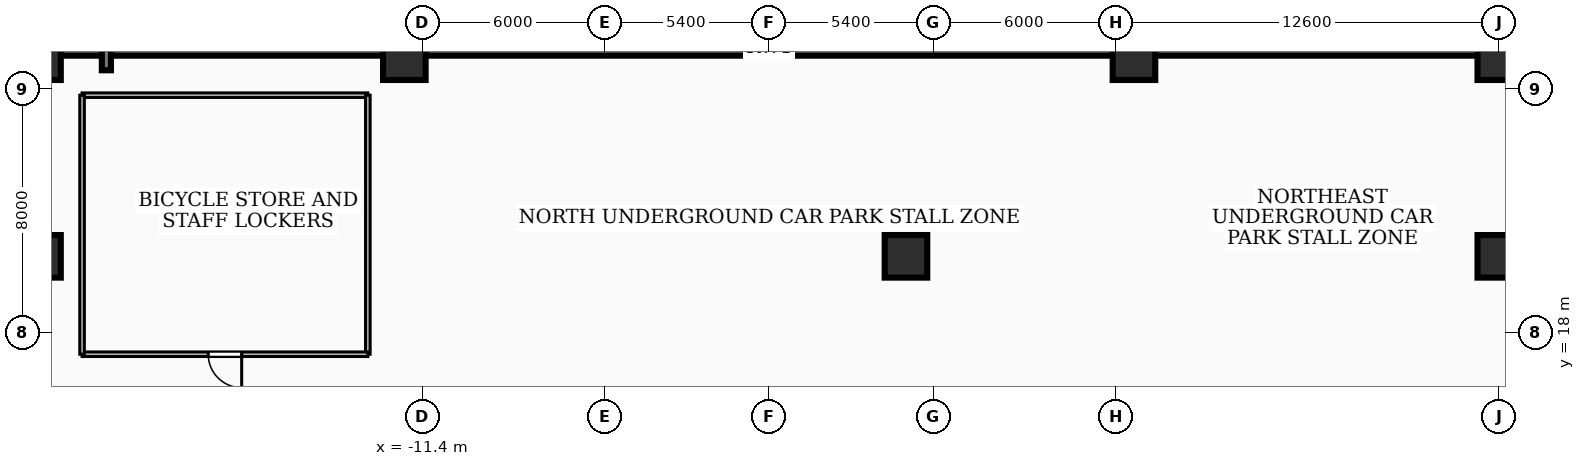
"""IFC4 building model, lengths in metres.
Left out: names, types, materials, properties, quantities, classifications, styles, units other than length and angle.
Written with IfcOpenShell. Run it as: python <this file> out.ifc"""

import sys

from ifc_helpers import new_model, si_unit, direction, frame, frame_2d, origin, origin_2d, place, context, subcontext, project, spatial, rectangle, extrude, element, fill, save


model = new_model("IFC4")
c1 = context("Model", 3, precision=1e-05, world=origin(), true_north=direction((0.0, 1.0)))
c2 = subcontext(c1, "Body", "Model", "MODEL_VIEW")
j1 = project(units=[si_unit("LENGTHUNIT", "METRE"), si_unit("PLANEANGLEUNIT", "RADIAN")], contexts=[c1])
p1 = place(None, origin())
s1 = spatial("IfcSite", under=j1, at=p1, CompositionType="ELEMENT")
p2 = place(p1, origin())
s2 = spatial("IfcBuilding", under=s1, at=p2, CompositionType="ELEMENT")
p3 = place(p2, frame((0.0, 0.0, -4.5)))
s3 = spatial("IfcBuildingStorey", under=s2, at=p3, CompositionType="ELEMENT", Elevation=-4.5)
p4 = place(p3, frame((-35.75, 27.35, 0.0), z_axis=(0.0, 0.0, 1.0), x_axis=(1.0, 0.0, 0.0)))
e1 = element("IfcWall", 1, at=p4, inside=s3, PredefinedType="USERDEFINED", context=c2, shape_type="SweptSolid", body=[
    extrude(rectangle(XDim=71.5, YDim=0.5, at=frame_2d((35.75, 0.0))), origin(), (0.0, 0.0, 1.0), 4.18),
])
p5 = place(p3, frame((-21.8, 26.62, -4.85), z_axis=(0.0, 0.0, 1.0), x_axis=(0.0, 1.0, 0.0)))
e2 = element("IfcWall", 2, at=p5, inside=s3, PredefinedType="SOLIDWALL", context=c2, shape_type="SweptSolid", body=[
    extrude(rectangle(XDim=1.96, YDim=0.3, at=frame_2d((0.98, 0.0))), origin(), (0.0, 0.0, 1.0), 9.35),
])
for number, where, z_axis, x_axis in (
    (3, (-24.0, 27.0, 0.0), (0.0, 0.0, 1.0), (1.0, 0.0, 0.0)),
    (4, (-12.0, 27.0, 0.0), (0.0, 0.0, 1.0), (1.0, 0.0, 0.0)),
    (5, (12.0, 27.0, 0.0), (0.0, 0.0, 1.0), (1.0, 0.0, 0.0)),
    (6, (24.0, 27.0, 0.0), (0.0, 0.0, 1.0), (1.0, 0.0, 0.0)),
    (7, (4.5, 20.5, 0.0), (0.0, 0.0, 1.0), (1.0, 0.0, 0.0)),
    (8, (-24.0, 20.5, 0.0), (0.0, 0.0, 1.0), (1.0, 0.0, 0.0)),
    (9, (24.0, 20.5, 0.0), (0.0, 0.0, 1.0), (1.0, 0.0, 0.0)),
):
    element("IfcColumn", number, at=place(p3, frame(where, z_axis=z_axis, x_axis=x_axis)), inside=s3, PredefinedType="COLUMN", context=c2, shape_type="SweptSolid", body=[
        extrude(rectangle(XDim=1.4, YDim=1.4, at=origin_2d()), origin(), (0.0, 0.0, 1.0), 4.5),
    ])
p6 = place(p3, frame((-13.2, 17.28, 0.0), z_axis=(0.0, 0.0, 1.0), x_axis=(-1.0, 0.0, 0.0)))
e10 = element("IfcWall", 10, at=p6, inside=s3, PredefinedType="PARTITIONING", context=c2, shape_type="SweptSolid", body=[
    extrude(rectangle(XDim=9.4, YDim=0.15, at=frame_2d((4.7, 0.0))), origin(), (0.0, 0.0, 1.0), 4.18),
])
p7 = place(p6, frame((4.15, 0.0, 0.0)))
e11 = element("IfcOpeningElement", 11, at=p7, cuts=e10, PredefinedType="OPENING", context=c2, shape_type="SweptSolid", body=[
    extrude(rectangle(XDim=1.1, YDim=2.15, at=frame_2d((0.55, 1.075))), frame((0.0, 0.085, 0.0), z_axis=(0.0, -1.0, 0.0), x_axis=(1.0, 0.0, 0.0)), (0.0, 0.0, 1.0), 0.17),
])
for number, where, z_axis, x_axis in (
    (12, (-22.6, 17.28, 0.0), (0.0, 0.0, 1.0), (0.0, 1.0, 0.0)),
    (13, (-13.2, 17.28, 0.0), (0.0, 0.0, 1.0), (0.0, 1.0, 0.0)),
):
    element("IfcWall", number, at=place(p3, frame(where, z_axis=z_axis, x_axis=x_axis)), inside=s3, PredefinedType="PARTITIONING", context=c2, shape_type="SweptSolid", body=[
        extrude(rectangle(XDim=8.52, YDim=0.15, at=frame_2d((4.26, 0.0))), origin(), (0.0, 0.0, 1.0), 3.072),
    ])
p8 = place(p3, frame((-22.6, 25.8, 0.0), z_axis=(0.0, 0.0, 1.0), x_axis=(1.0, 0.0, 0.0)))
e14 = element("IfcWall", 14, at=p8, inside=s3, PredefinedType="PARTITIONING", context=c2, shape_type="SweptSolid", body=[
    extrude(rectangle(XDim=9.4, YDim=0.15, at=frame_2d((4.7, 0.0))), origin(), (0.0, 0.0, 1.0), 4.18),
])
p9 = place(p7, origin())
e15 = element("IfcDoor", 15, at=p9, inside=s3, OperationType="SINGLE_SWING_LEFT", PredefinedType="DOOR", context=c2, shape_type="SweptSolid", body=[
    extrude(rectangle(XDim=1.1, YDim=2.15, at=frame_2d((0.55, 1.075))), frame((0.0, 0.025, 0.0), z_axis=(0.0, -1.0, 0.0), x_axis=(1.0, 0.0, 0.0)), (0.0, 0.0, 1.0), 0.05),
])
fill(e11, e15)
save(model, sys.argv[1])
